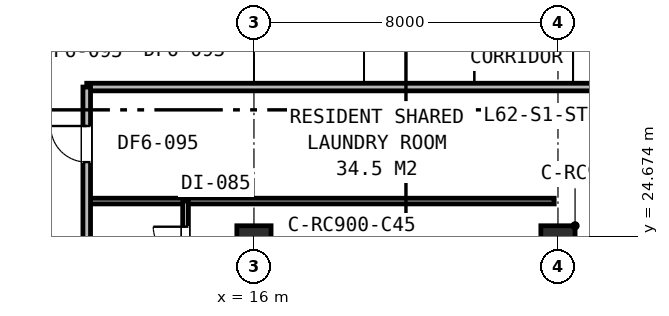
"""IFC4 building model, lengths in metres.
Left out: names, types, materials, properties, quantities, classifications, styles, units other than length and angle.
Written with IfcOpenShell. Run it as: python <this file> out.ifc"""

import sys

from ifc_helpers import new_model, si_unit, direction, frame, frame_2d, origin, origin_2d, place, context, subcontext, project, spatial, rectangle, extrude, element, fill, save


model = new_model("IFC4")
c1 = context("Model", 3, precision=1e-05, world=origin(), true_north=direction((0.0, 1.0)))
c2 = subcontext(c1, "Body", "Model", "MODEL_VIEW")
j1 = project(units=[si_unit("LENGTHUNIT", "METRE"), si_unit("PLANEANGLEUNIT", "RADIAN")], contexts=[c1])
p1 = place(None, origin())
s1 = spatial("IfcSite", under=j1, at=p1, CompositionType="ELEMENT")
p2 = place(p1, origin())
s2 = spatial("IfcBuilding", under=s1, at=p2, CompositionType="ELEMENT")
p3 = place(p2, frame((0.0, 0.0, 241.2)))
s3 = spatial("IfcBuildingStorey", under=s2, at=p3, CompositionType="ELEMENT", Elevation=241.2)
for number, where, z_axis, x_axis in (
    (1, (16.0, 24.5, 0.0), (0.0, 0.0, 1.0), (1.0, 0.0, 0.0)),
    (2, (24.0, 24.5, 0.0), (0.0, 0.0, 1.0), (1.0, 0.0, 0.0)),
):
    element("IfcColumn", number, at=place(p3, frame(where, z_axis=z_axis, x_axis=x_axis)), inside=s3, PredefinedType="COLUMN", context=c2, shape_type="SweptSolid", body=[
        extrude(rectangle(XDim=0.9, YDim=0.9, at=origin_2d()), origin(), (0.0, 0.0, 1.0), 3.8),
    ])
p4 = place(p3, frame((11.6, 28.6, 0.0), z_axis=(0.0, 0.0, 1.0), x_axis=(1.0, 0.0, 0.0)))
e3 = element("IfcWall", 3, at=p4, inside=s3, PredefinedType="PARTITIONING", context=c2, shape_type="SweptSolid", body=[
    extrude(rectangle(XDim=34.3, YDim=0.2, at=frame_2d((17.15, 0.0))), origin(), (0.0, 0.0, 1.0), 3.16),
])
p5 = place(p4, frame((14.625, 0.0, 0.0)))
e4 = element("IfcOpeningElement", 4, at=p5, cuts=e3, PredefinedType="OPENING", context=c2, shape_type="SweptSolid", body=[
    extrude(rectangle(XDim=0.95, YDim=2.15, at=frame_2d((0.475, 1.075))), frame((0.0, 0.11, 0.0), z_axis=(0.0, -1.0, 0.0), x_axis=(1.0, 0.0, 0.0)), (0.0, 0.0, 1.0), 0.22),
])
p6 = place(p4, frame((26.225, 0.0, 0.0)))
e5 = element("IfcOpeningElement", 5, at=p6, cuts=e3, PredefinedType="OPENING", context=c2, shape_type="SweptSolid", body=[
    extrude(rectangle(XDim=0.95, YDim=2.15, at=frame_2d((0.475, 1.075))), frame((0.0, 0.11, 0.0), z_axis=(0.0, -1.0, 0.0), x_axis=(1.0, 0.0, 0.0)), (0.0, 0.0, 1.0), 0.22),
])
p7 = place(p3, frame((11.6, 25.6, 0.0), z_axis=(0.0, 0.0, 1.0), x_axis=(1.0, 0.0, 0.0)))
e6 = element("IfcWall", 6, at=p7, inside=s3, PredefinedType="PARTITIONING", context=c2, shape_type="SweptSolid", body=[
    extrude(rectangle(XDim=12.3, YDim=0.15, at=frame_2d((6.15, 0.0))), origin(), (0.0, 0.0, 1.0), 3.16),
])
p8 = place(p3, frame((11.6, 17.0, 0.0), z_axis=(0.0, 0.0, 1.0), x_axis=(0.0, 1.0, 0.0)))
e7 = element("IfcWall", 7, at=p8, inside=s3, PredefinedType="PARTITIONING", context=c2, shape_type="SweptSolid", body=[
    extrude(rectangle(XDim=11.6, YDim=0.2, at=frame_2d((5.8, 0.0))), origin(), (0.0, 0.0, 1.0), 3.16),
])
p9 = place(p8, frame((9.625, 0.0, 0.0)))
e8 = element("IfcOpeningElement", 8, at=p9, cuts=e7, PredefinedType="OPENING", context=c2, shape_type="SweptSolid", body=[
    extrude(rectangle(XDim=0.95, YDim=2.15, at=frame_2d((0.475, 1.075))), frame((0.0, 0.11, 0.0), z_axis=(0.0, -1.0, 0.0), x_axis=(1.0, 0.0, 0.0)), (0.0, 0.0, 1.0), 0.22),
])
p10 = place(p8, frame((1.625, 0.0, 0.0)))
e9 = element("IfcOpeningElement", 9, at=p10, cuts=e7, PredefinedType="OPENING", context=c2, shape_type="SweptSolid", body=[
    extrude(rectangle(XDim=0.95, YDim=2.15, at=frame_2d((0.475, 1.075))), frame((0.0, 0.11, 0.0), z_axis=(0.0, -1.0, 0.0), x_axis=(1.0, 0.0, 0.0)), (0.0, 0.0, 1.0), 0.22),
])
p11 = place(p3, frame((14.2, 21.2, 0.0), z_axis=(0.0, 0.0, 1.0), x_axis=(0.0, 1.0, 0.0)))
e10 = element("IfcWall", 10, at=p11, inside=s3, PredefinedType="PARTITIONING", context=c2, shape_type="SweptSolid", body=[
    extrude(rectangle(XDim=4.4, YDim=0.15, at=frame_2d((2.2, 0.0))), origin(), (0.0, 0.0, 1.0), 3.16),
])
p12 = place(p11, frame((0.675, 0.0, 0.0)))
e11 = element("IfcOpeningElement", 11, at=p12, cuts=e10, PredefinedType="OPENING", context=c2, shape_type="SweptSolid", body=[
    extrude(rectangle(XDim=0.85, YDim=2.15, at=frame_2d((0.425, 1.075))), frame((0.0, 0.085, 0.0), z_axis=(0.0, -1.0, 0.0), x_axis=(1.0, 0.0, 0.0)), (0.0, 0.0, 1.0), 0.17),
])
p13 = place(p11, frame((2.875, 0.0, 0.0)))
e12 = element("IfcOpeningElement", 12, at=p13, cuts=e10, PredefinedType="OPENING", context=c2, shape_type="SweptSolid", body=[
    extrude(rectangle(XDim=0.85, YDim=2.15, at=frame_2d((0.425, 1.075))), frame((0.0, 0.085, 0.0), z_axis=(0.0, -1.0, 0.0), x_axis=(1.0, 0.0, 0.0)), (0.0, 0.0, 1.0), 0.17),
])
p14 = place(p9, origin())
e13 = element("IfcDoor", 13, at=p14, inside=s3, OperationType="SINGLE_SWING_RIGHT", PredefinedType="DOOR", context=c2, shape_type="SweptSolid", body=[
    extrude(rectangle(XDim=0.95, YDim=2.15, at=frame_2d((0.475, 1.075))), frame((0.0, 0.025, 0.0), z_axis=(0.0, -1.0, 0.0), x_axis=(1.0, 0.0, 0.0)), (0.0, 0.0, 1.0), 0.05),
])
fill(e8, e13)
p15 = place(p13, origin())
e14 = element("IfcDoor", 14, at=p15, inside=s3, OperationType="SINGLE_SWING_RIGHT", PredefinedType="DOOR", context=c2, shape_type="SweptSolid", body=[
    extrude(rectangle(XDim=0.85, YDim=2.15, at=frame_2d((0.425, 1.075))), frame((0.0, 0.025, 0.0), z_axis=(0.0, -1.0, 0.0), x_axis=(1.0, 0.0, 0.0)), (0.0, 0.0, 1.0), 0.05),
])
fill(e12, e14)
save(model, sys.argv[1])
